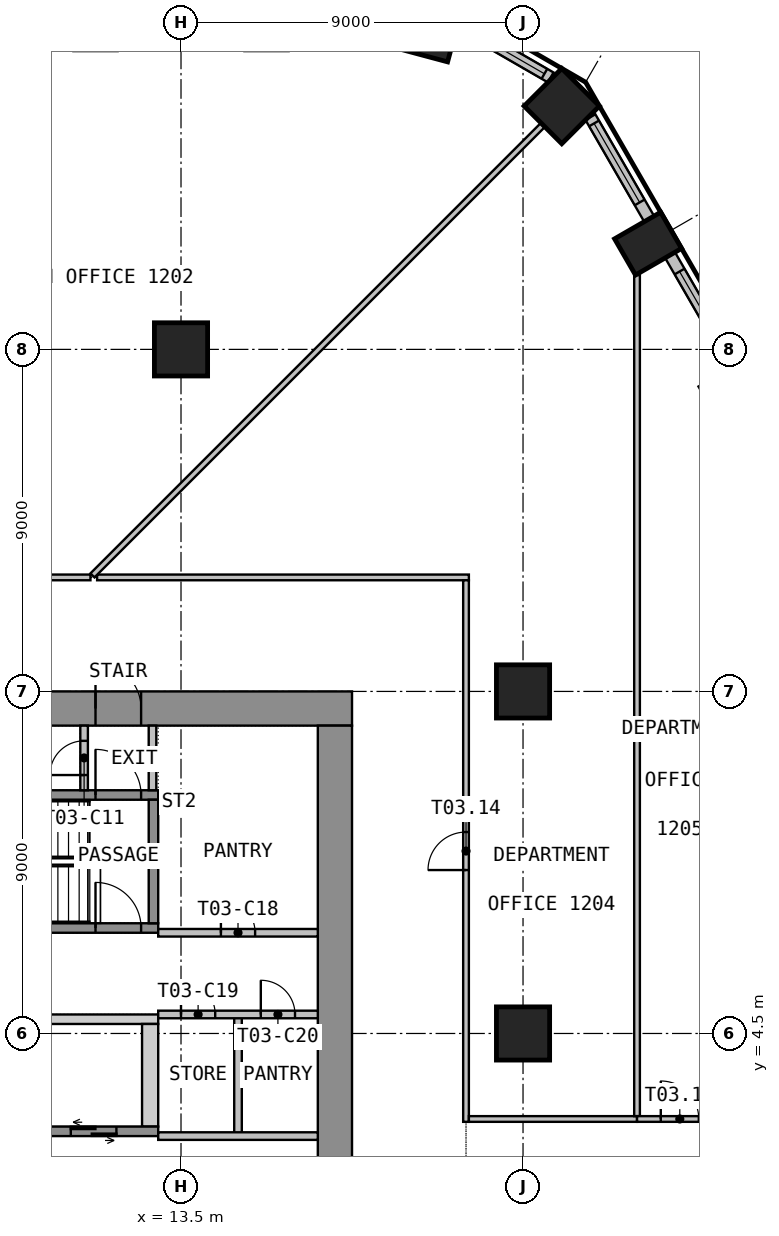
"""IFC4 building model, lengths in metres.
Left out: names, types, materials, properties, quantities, classifications, styles, units other than length and angle.
Written with IfcOpenShell. Run it as: python <this file> out.ifc"""

import sys

from ifc_helpers import new_model, si_unit, direction, frame, frame_2d, origin, origin_2d, place, context, subcontext, project, spatial, polyline, rectangle, circle, outline, extrude, element, fill, save


model = new_model("IFC4")
c1 = context("Model", 3, precision=1e-05, world=origin(), true_north=direction((0.0, 1.0)))
c2 = subcontext(c1, "Body", "Model", "MODEL_VIEW")
j1 = project(units=[si_unit("LENGTHUNIT", "METRE"), si_unit("PLANEANGLEUNIT", "RADIAN")], contexts=[c1])
p1 = place(None, origin())
s1 = spatial("IfcSite", under=j1, at=p1, CompositionType="ELEMENT")
p2 = place(p1, origin())
s2 = spatial("IfcBuilding", under=s1, at=p2, CompositionType="ELEMENT")
p3 = place(p2, frame((0.0, 0.0, 53.4)))
s3 = spatial("IfcBuildingStorey", under=s2, at=p3, CompositionType="ELEMENT", Elevation=53.4)
p4 = place(p3, frame((25.791, 25.283, 0.0), z_axis=(0.0, 0.0, 1.0), x_axis=(-0.5, 0.866025403784, 0.0)))
e1 = element("IfcColumn", 1, at=p4, inside=s3, PredefinedType="COLUMN", context=c2, shape_type="SweptSolid", body=[
    extrude(rectangle(XDim=1.1, YDim=1.4, at=origin_2d()), origin(), (0.0, 0.0, 1.0), 3.525),
])
for number, where, z_axis, x_axis in (
    (2, (23.52, 28.902, 0.0), (0.0, 0.0, 1.0), (-0.707, 0.707, 0.0)),
    (3, (20.02, 30.923, 0.0), (0.0, 0.0, 1.0), (-0.966, 0.259, 0.0)),
):
    element("IfcColumn", number, at=place(p3, frame(where, z_axis=z_axis, x_axis=x_axis)), inside=s3, PredefinedType="COLUMN", context=c2, shape_type="SweptSolid", body=[
        extrude(rectangle(XDim=1.4, YDim=1.4, at=origin_2d()), origin(), (0.0, 0.0, 1.0), 3.525),
    ])
for number, where, z_axis, x_axis in (
    (4, (13.5, 22.5, 0.0), (0.0, 0.0, 1.0), (1.0, 0.0, 0.0)),
    (5, (22.5, 4.5, 0.0), (0.0, 0.0, 1.0), (1.0, 0.0, 0.0)),
    (6, (22.5, 13.5, 0.0), (0.0, 0.0, 1.0), (1.0, 0.0, 0.0)),
):
    element("IfcColumn", number, at=place(p3, frame(where, z_axis=z_axis, x_axis=x_axis)), inside=s3, PredefinedType="COLUMN", context=c2, shape_type="SweptSolid", body=[
        extrude(circle(Radius=0.7, at=origin_2d()), origin(), (0.0, 0.0, 1.0), 3.525),
    ])
p5 = place(p3, frame((28.069, 22.037, 0.0), z_axis=(0.0, 0.0, 1.0), x_axis=(-0.499993955907, 0.866028893315, 0.0)))
e7 = element("IfcWall", 7, at=p5, inside=s3, PredefinedType="SOLIDWALL", context=c2, shape_type="SweptSolid", body=[
    extrude(rectangle(XDim=3.399, YDim=0.3, at=frame_2d((1.699, 0.0))), origin(), (0.0, 0.0, 1.0), 3.525),
])
p6 = place(p5, frame((0.5, 0.0, 0.9)))
e8 = element("IfcOpeningElement", 8, at=p6, cuts=e7, PredefinedType="OPENING", context=c2, shape_type="SweptSolid", body=[
    extrude(rectangle(XDim=2.4, YDim=2.1, at=frame_2d((1.2, 1.05))), frame((0.0, 0.16, 0.0), z_axis=(0.0, -1.0, 0.0), x_axis=(1.0, 0.0, 0.0)), (0.0, 0.0, 1.0), 0.32),
])
p7 = place(p3, frame((25.819, 25.934, 0.0), z_axis=(0.0, 0.0, 1.0), x_axis=(-0.499995950774, 0.866027741594, 0.0)))
e9 = element("IfcWall", 9, at=p7, inside=s3, PredefinedType="SOLIDWALL", context=c2, shape_type="SweptSolid", body=[
    extrude(rectangle(XDim=3.091, YDim=0.3, at=frame_2d((1.545, 0.0))), origin(), (0.0, 0.0, 1.0), 3.525),
])
p8 = place(p7, frame((0.5, 0.0, 0.9)))
e10 = element("IfcOpeningElement", 10, at=p8, cuts=e9, PredefinedType="OPENING", context=c2, shape_type="SweptSolid", body=[
    extrude(rectangle(XDim=2.4, YDim=2.1, at=frame_2d((1.2, 1.05))), frame((0.0, 0.16, 0.0), z_axis=(0.0, -1.0, 0.0), x_axis=(1.0, 0.0, 0.0)), (0.0, 0.0, 1.0), 0.32),
])
p9 = place(p3, frame((23.228, 29.656, 0.0), z_axis=(0.0, 0.0, 1.0), x_axis=(-0.866020456713, 0.500008568482, 0.0)))
e11 = element("IfcWall", 11, at=p9, inside=s3, PredefinedType="SOLIDWALL", context=c2, shape_type="SweptSolid", body=[
    extrude(rectangle(XDim=2.782, YDim=0.3, at=frame_2d((1.391, 0.0))), origin(), (0.0, 0.0, 1.0), 3.525),
])
p10 = place(p9, frame((0.191, 0.0, 0.9)))
e12 = element("IfcOpeningElement", 12, at=p10, cuts=e11, PredefinedType="OPENING", context=c2, shape_type="SweptSolid", body=[
    extrude(rectangle(XDim=2.4, YDim=2.1, at=frame_2d((1.2, 1.05))), frame((0.0, 0.16, 0.0), z_axis=(0.0, -1.0, 0.0), x_axis=(1.0, 0.0, 0.0)), (0.0, 0.0, 1.0), 0.32),
])
p11 = place(p3, frame((-18.0, 13.05, 0.0), z_axis=(0.0, 0.0, 1.0), x_axis=(1.0, 0.0, 0.0)))
e13 = element("IfcWall", 13, at=p11, inside=s3, PredefinedType="SHEAR", context=c2, shape_type="SweptSolid", body=[
    extrude(rectangle(XDim=36.0, YDim=0.9, at=frame_2d((18.0, 0.0))), origin(), (0.0, 0.0, 1.0), 3.525),
])
p12 = place(p11, frame((16.8, 0.0, 0.0)))
e14 = element("IfcOpeningElement", 14, at=p12, cuts=e13, PredefinedType="OPENING", context=c2, shape_type="SweptSolid", body=[
    extrude(rectangle(XDim=2.4, YDim=2.1, at=frame_2d((1.2, 1.05))), frame((0.0, 0.46, 0.0), z_axis=(0.0, -1.0, 0.0), x_axis=(1.0, 0.0, 0.0)), (0.0, 0.0, 1.0), 0.92),
])
p13 = place(p11, frame((5.55, 0.0, 0.0)))
e15 = element("IfcOpeningElement", 15, at=p13, cuts=e13, PredefinedType="OPENING", context=c2, shape_type="SweptSolid", body=[
    extrude(rectangle(XDim=1.2, YDim=2.1, at=frame_2d((0.6, 1.05))), frame((0.0, 0.46, 0.0), z_axis=(0.0, -1.0, 0.0), x_axis=(1.0, 0.0, 0.0)), (0.0, 0.0, 1.0), 0.92),
])
p14 = place(p11, frame((29.25, 0.0, 0.0)))
e16 = element("IfcOpeningElement", 16, at=p14, cuts=e13, PredefinedType="OPENING", context=c2, shape_type="SweptSolid", body=[
    extrude(rectangle(XDim=1.2, YDim=2.1, at=frame_2d((0.6, 1.05))), frame((0.0, 0.46, 0.0), z_axis=(0.0, -1.0, 0.0), x_axis=(1.0, 0.0, 0.0)), (0.0, 0.0, 1.0), 0.92),
])
p15 = place(p3, frame((17.55, -12.6, 0.0), z_axis=(0.0, 0.0, 1.0), x_axis=(0.0, 1.0, 0.0)))
e17 = element("IfcWall", 17, at=p15, inside=s3, PredefinedType="SHEAR", context=c2, shape_type="SweptSolid", body=[
    extrude(rectangle(XDim=25.2, YDim=0.9, at=frame_2d((12.6, 0.0))), origin(), (0.0, 0.0, 1.0), 3.525),
])
p16 = place(p15, frame((11.4, 0.0, 0.0)))
e18 = element("IfcOpeningElement", 18, at=p16, cuts=e17, PredefinedType="OPENING", context=c2, shape_type="SweptSolid", body=[
    extrude(rectangle(XDim=2.4, YDim=2.1, at=frame_2d((1.2, 1.05))), frame((0.0, 0.46, 0.0), z_axis=(0.0, -1.0, 0.0), x_axis=(1.0, 0.0, 0.0)), (0.0, 0.0, 1.0), 0.92),
])
p17 = place(p3, origin())
e19 = element("IfcWall", 19, at=p17, inside=s3, PredefinedType="SHEAR", context=c2, shape_type="SweptSolid", body=[
    extrude(outline(polyline([(-12.9, 4.75), (12.9, 4.75), (12.9, 5.0), (-12.9, 5.0), (-12.9, 4.75)])), origin(), (0.0, 0.0, 1.0), 3.525),
])
p18 = place(p3, origin())
e20 = element("IfcWall", 20, at=p18, inside=s3, PredefinedType="SHEAR", context=c2, shape_type="SweptSolid", body=[
    extrude(outline(polyline([(12.475, 2.05), (12.9, 2.05), (12.9, 4.75), (12.475, 4.75), (12.475, 2.05)])), origin(), (0.0, 0.0, 1.0), 3.525),
])
p19 = place(p3, frame((-12.9, 1.925, 0.0), z_axis=(0.0, 0.0, 1.0), x_axis=(1.0, 0.0, 0.0)))
e21 = element("IfcWall", 21, at=p19, inside=s3, PredefinedType="SHEAR", context=c2, shape_type="SweptSolid", body=[
    extrude(rectangle(XDim=25.8, YDim=0.25, at=frame_2d((12.9, 0.0))), origin(), (0.0, 0.0, 1.0), 3.525),
])
p20 = place(p19, frame((9.5, 0.0, 0.0)))
e22 = element("IfcOpeningElement", 22, at=p20, cuts=e21, PredefinedType="OPENING", context=c2, shape_type="SweptSolid", body=[
    extrude(rectangle(XDim=1.2, YDim=2.1, at=frame_2d((0.6, 1.05))), frame((0.0, 0.135, 0.0), z_axis=(0.0, -1.0, 0.0), x_axis=(1.0, 0.0, 0.0)), (0.0, 0.0, 1.0), 0.27),
])
p21 = place(p19, frame((12.3, 0.0, 0.0)))
e23 = element("IfcOpeningElement", 23, at=p21, cuts=e21, PredefinedType="OPENING", context=c2, shape_type="SweptSolid", body=[
    extrude(rectangle(XDim=1.2, YDim=2.1, at=frame_2d((0.6, 1.05))), frame((0.0, 0.135, 0.0), z_axis=(0.0, -1.0, 0.0), x_axis=(1.0, 0.0, 0.0)), (0.0, 0.0, 1.0), 0.27),
])
p22 = place(p19, frame((15.1, 0.0, 0.0)))
e24 = element("IfcOpeningElement", 24, at=p22, cuts=e21, PredefinedType="OPENING", context=c2, shape_type="SweptSolid", body=[
    extrude(rectangle(XDim=1.2, YDim=2.1, at=frame_2d((0.6, 1.05))), frame((0.0, 0.135, 0.0), z_axis=(0.0, -1.0, 0.0), x_axis=(1.0, 0.0, 0.0)), (0.0, 0.0, 1.0), 0.27),
])
p23 = place(p19, frame((17.9, 0.0, 0.0)))
e25 = element("IfcOpeningElement", 25, at=p23, cuts=e21, PredefinedType="OPENING", context=c2, shape_type="SweptSolid", body=[
    extrude(rectangle(XDim=1.2, YDim=2.1, at=frame_2d((0.6, 1.05))), frame((0.0, 0.135, 0.0), z_axis=(0.0, -1.0, 0.0), x_axis=(1.0, 0.0, 0.0)), (0.0, 0.0, 1.0), 0.27),
])
p24 = place(p19, frame((20.7, 0.0, 0.0)))
e26 = element("IfcOpeningElement", 26, at=p24, cuts=e21, PredefinedType="OPENING", context=c2, shape_type="SweptSolid", body=[
    extrude(rectangle(XDim=1.2, YDim=2.1, at=frame_2d((0.6, 1.05))), frame((0.0, 0.135, 0.0), z_axis=(0.0, -1.0, 0.0), x_axis=(1.0, 0.0, 0.0)), (0.0, 0.0, 1.0), 0.27),
])
p25 = place(p19, frame((23.5, 0.0, 0.0)))
e27 = element("IfcOpeningElement", 27, at=p25, cuts=e21, PredefinedType="OPENING", context=c2, shape_type="SweptSolid", body=[
    extrude(rectangle(XDim=1.2, YDim=2.1, at=frame_2d((0.6, 1.05))), frame((0.0, 0.135, 0.0), z_axis=(0.0, -1.0, 0.0), x_axis=(1.0, 0.0, 0.0)), (0.0, 0.0, 1.0), 0.27),
])
p26 = place(p3, frame((2.8, 7.275, 0.0), z_axis=(0.0, 0.0, 1.0), x_axis=(1.0, 0.0, 0.0)))
e28 = element("IfcWall", 28, at=p26, inside=s3, PredefinedType="SHEAR", context=c2, shape_type="SweptSolid", body=[
    extrude(rectangle(XDim=10.1, YDim=0.25, at=frame_2d((5.05, 0.0))), origin(), (0.0, 0.0, 1.0), 3.525),
])
p27 = place(p26, frame((8.45, 0.0, 0.0)))
e29 = element("IfcOpeningElement", 29, at=p27, cuts=e28, PredefinedType="OPENING", context=c2, shape_type="SweptSolid", body=[
    extrude(rectangle(XDim=1.2, YDim=2.1, at=frame_2d((0.6, 1.05))), frame((0.0, 0.135, 0.0), z_axis=(0.0, -1.0, 0.0), x_axis=(1.0, 0.0, 0.0)), (0.0, 0.0, 1.0), 0.27),
])
p28 = place(p3, frame((2.8, 10.775, 0.0), z_axis=(0.0, 0.0, 1.0), x_axis=(1.0, 0.0, 0.0)))
e30 = element("IfcWall", 30, at=p28, inside=s3, PredefinedType="SHEAR", context=c2, shape_type="SweptSolid", body=[
    extrude(rectangle(XDim=10.1, YDim=0.25, at=frame_2d((5.05, 0.0))), origin(), (0.0, 0.0, 1.0), 3.525),
])
p29 = place(p28, frame((8.45, 0.0, 0.0)))
e31 = element("IfcOpeningElement", 31, at=p29, cuts=e30, PredefinedType="OPENING", context=c2, shape_type="SweptSolid", body=[
    extrude(rectangle(XDim=1.2, YDim=2.1, at=frame_2d((0.6, 1.05))), frame((0.0, 0.135, 0.0), z_axis=(0.0, -1.0, 0.0), x_axis=(1.0, 0.0, 0.0)), (0.0, 0.0, 1.0), 0.27),
])
p30 = place(p3, frame((12.775, 7.4, 0.0), z_axis=(0.0, 0.0, 1.0), x_axis=(0.0, 1.0, 0.0)))
e32 = element("IfcWall", 32, at=p30, inside=s3, PredefinedType="SHEAR", context=c2, shape_type="SweptSolid", body=[
    extrude(rectangle(XDim=3.25, YDim=0.25, at=frame_2d((1.625, 0.0))), origin(), (0.0, 0.0, 1.0), 3.525),
])
p31 = place(p3, frame((12.75, 10.9, 0.0), z_axis=(0.0, 0.0, 1.0), x_axis=(0.0, 1.0, 0.0)))
e33 = element("IfcWall", 33, at=p31, inside=s3, PredefinedType="PARTITIONING", context=c2, shape_type="SweptSolid", body=[
    extrude(rectangle(XDim=1.7, YDim=0.2, at=frame_2d((0.85, 0.0))), origin(), (0.0, 0.0, 1.0), 3.525),
])
p32 = place(p3, frame((10.95, 10.9, 0.0), z_axis=(0.0, 0.0, 1.0), x_axis=(0.0, 1.0, 0.0)))
e34 = element("IfcWall", 34, at=p32, inside=s3, PredefinedType="PARTITIONING", context=c2, shape_type="SweptSolid", body=[
    extrude(rectangle(XDim=1.7, YDim=0.2, at=frame_2d((0.85, 0.0))), origin(), (0.0, 0.0, 1.0), 3.525),
])
p33 = place(p32, frame((0.4, 0.0, 0.0)))
e35 = element("IfcOpeningElement", 35, at=p33, cuts=e34, PredefinedType="OPENING", context=c2, shape_type="SweptSolid", body=[
    extrude(rectangle(XDim=0.9, YDim=2.1, at=frame_2d((0.45, 1.05))), frame((0.0, 0.11, 0.0), z_axis=(0.0, -1.0, 0.0), x_axis=(1.0, 0.0, 0.0)), (0.0, 0.0, 1.0), 0.22),
])
p34 = place(p3, frame((12.9, 7.15, 0.0), z_axis=(0.0, 0.0, 1.0), x_axis=(1.0, 0.0, 0.0)))
e36 = element("IfcWall", 36, at=p34, inside=s3, PredefinedType="PARTITIONING", context=c2, shape_type="SweptSolid", body=[
    extrude(rectangle(XDim=4.2, YDim=0.2, at=frame_2d((2.1, 0.0))), origin(), (0.0, 0.0, 1.0), 3.525),
])
p35 = place(p34, frame((1.65, 0.0, 0.0)))
e37 = element("IfcOpeningElement", 37, at=p35, cuts=e36, PredefinedType="OPENING", context=c2, shape_type="SweptSolid", body=[
    extrude(rectangle(XDim=0.9, YDim=2.1, at=frame_2d((0.45, 1.05))), frame((0.0, 0.11, 0.0), z_axis=(0.0, -1.0, 0.0), x_axis=(1.0, 0.0, 0.0)), (0.0, 0.0, 1.0), 0.22),
])
p36 = place(p3, frame((15.0, 1.8, 0.0), z_axis=(0.0, 0.0, 1.0), x_axis=(0.0, 1.0, 0.0)))
e38 = element("IfcWall", 38, at=p36, inside=s3, PredefinedType="PARTITIONING", context=c2, shape_type="SweptSolid", body=[
    extrude(rectangle(XDim=3.2, YDim=0.2, at=frame_2d((1.6, 0.0))), origin(), (0.0, 0.0, 1.0), 3.525),
])
p37 = place(p3, frame((12.9, 5.0, 0.0), z_axis=(0.0, 0.0, 1.0), x_axis=(1.0, 0.0, 0.0)))
e39 = element("IfcWall", 39, at=p37, inside=s3, PredefinedType="PARTITIONING", context=c2, shape_type="SweptSolid", body=[
    extrude(rectangle(XDim=4.2, YDim=0.2, at=frame_2d((2.1, 0.0))), origin(), (0.0, 0.0, 1.0), 3.525),
])
p38 = place(p37, frame((0.6, 0.0, 0.0)))
e40 = element("IfcOpeningElement", 40, at=p38, cuts=e39, PredefinedType="OPENING", context=c2, shape_type="SweptSolid", body=[
    extrude(rectangle(XDim=0.9, YDim=2.1, at=frame_2d((0.45, 1.05))), frame((0.0, 0.11, 0.0), z_axis=(0.0, -1.0, 0.0), x_axis=(1.0, 0.0, 0.0)), (0.0, 0.0, 1.0), 0.22),
])
p39 = place(p37, frame((2.7, 0.0, 0.0)))
e41 = element("IfcOpeningElement", 41, at=p39, cuts=e39, PredefinedType="OPENING", context=c2, shape_type="SweptSolid", body=[
    extrude(rectangle(XDim=0.9, YDim=2.1, at=frame_2d((0.45, 1.05))), frame((0.0, 0.11, 0.0), z_axis=(0.0, -1.0, 0.0), x_axis=(1.0, 0.0, 0.0)), (0.0, 0.0, 1.0), 0.22),
])
p40 = place(p3, frame((12.9, 1.8, 0.0), z_axis=(0.0, 0.0, 1.0), x_axis=(1.0, 0.0, 0.0)))
e42 = element("IfcWall", 42, at=p40, inside=s3, PredefinedType="PARTITIONING", context=c2, shape_type="SweptSolid", body=[
    extrude(rectangle(XDim=4.2, YDim=0.2, at=frame_2d((2.1, 0.0))), origin(), (0.0, 0.0, 1.0), 3.525),
])
p41 = place(p3, frame((11.117, 16.5, 0.0), z_axis=(0.0, 0.0, 1.0), x_axis=(-1.0, 0.0, 0.0)))
e43 = element("IfcWall", 43, at=p41, inside=s3, PredefinedType="PARTITIONING", context=c2, shape_type="SweptSolid", body=[
    extrude(rectangle(XDim=4.367, YDim=0.15, at=frame_2d((2.184, 0.0))), origin(), (0.0, 0.0, 1.0), 3.525),
])
p42 = place(p3, frame((21.075, 16.5, 0.0), z_axis=(0.0, 0.0, 1.0), x_axis=(-1.0, 0.0, 0.0)))
e44 = element("IfcWall", 44, at=p42, inside=s3, PredefinedType="PARTITIONING", context=c2, shape_type="SweptSolid", body=[
    extrude(rectangle(XDim=9.783, YDim=0.15, at=frame_2d((4.892, 0.0))), origin(), (0.0, 0.0, 1.0), 3.525),
])
p43 = place(p3, frame((23.01, 28.393, 0.0), z_axis=(0.0, 0.0, 1.0), x_axis=(-0.707106781187, -0.707106781187, 0.0)))
e45 = element("IfcWall", 45, at=p43, inside=s3, PredefinedType="PARTITIONING", context=c2, shape_type="SweptSolid", body=[
    extrude(rectangle(XDim=16.745, YDim=0.15, at=frame_2d((8.373, 0.0))), origin(), (0.0, 0.0, 1.0), 3.525),
])
p44 = place(p3, frame((21.0, 2.175, 0.0), z_axis=(0.0, 0.0, 1.0), x_axis=(0.0, 1.0, 0.0)))
e46 = element("IfcWall", 46, at=p44, inside=s3, PredefinedType="PARTITIONING", context=c2, shape_type="SweptSolid", body=[
    extrude(rectangle(XDim=14.25, YDim=0.15, at=frame_2d((7.125, 0.0))), origin(), (0.0, 0.0, 1.0), 3.525),
])
p45 = place(p44, frame((6.625, 0.0, 0.0)))
e47 = element("IfcOpeningElement", 47, at=p45, cuts=e46, PredefinedType="OPENING", context=c2, shape_type="SweptSolid", body=[
    extrude(rectangle(XDim=1.0, YDim=2.1, at=frame_2d((0.5, 1.05))), frame((0.0, 0.085, 0.0), z_axis=(0.0, -1.0, 0.0), x_axis=(1.0, 0.0, 0.0)), (0.0, 0.0, 1.0), 0.17),
])
p46 = place(p3, frame((21.075, 2.25, 0.0), z_axis=(0.0, 0.0, 1.0), x_axis=(1.0, 0.0, 0.0)))
e48 = element("IfcWall", 48, at=p46, inside=s3, PredefinedType="PARTITIONING", context=c2, shape_type="SweptSolid", body=[
    extrude(rectangle(XDim=4.425, YDim=0.15, at=frame_2d((2.212, 0.0))), origin(), (0.0, 0.0, 1.0), 3.525),
])
p47 = place(p3, frame((25.5, 24.457, 0.0), z_axis=(0.0, 0.0, 1.0), x_axis=(0.0, -1.0, 0.0)))
e49 = element("IfcWall", 49, at=p47, inside=s3, PredefinedType="PARTITIONING", context=c2, shape_type="SweptSolid", body=[
    extrude(rectangle(XDim=22.132, YDim=0.15, at=frame_2d((11.066, 0.0))), origin(), (0.0, 0.0, 1.0), 3.525),
])
p48 = place(p3, frame((25.5, 2.25, 0.0), z_axis=(0.0, 0.0, 1.0), x_axis=(1.0, 0.0, 0.0)))
e50 = element("IfcWall", 50, at=p48, inside=s3, PredefinedType="PARTITIONING", context=c2, shape_type="SweptSolid", body=[
    extrude(rectangle(XDim=2.25, YDim=0.15, at=frame_2d((1.125, 0.0))), origin(), (0.0, 0.0, 1.0), 3.525),
])
p49 = place(p48, frame((0.625, 0.0, 0.0)))
e51 = element("IfcOpeningElement", 51, at=p49, cuts=e50, PredefinedType="OPENING", context=c2, shape_type="SweptSolid", body=[
    extrude(rectangle(XDim=1.0, YDim=2.1, at=frame_2d((0.5, 1.05))), frame((0.0, 0.085, 0.0), z_axis=(0.0, -1.0, 0.0), x_axis=(1.0, 0.0, 0.0)), (0.0, 0.0, 1.0), 0.17),
])
p50 = place(p6, origin())
e52 = element("IfcWindow", 52, at=p50, inside=s3, PartitioningType="SINGLE_PANEL", PredefinedType="WINDOW", context=c2, shape_type="SweptSolid", body=[
    extrude(rectangle(XDim=2.4, YDim=2.1, at=frame_2d((1.2, 1.05))), frame((0.0, 0.03, 0.0), z_axis=(0.0, -1.0, 0.0), x_axis=(1.0, 0.0, 0.0)), (0.0, 0.0, 1.0), 0.06),
])
fill(e8, e52)
p51 = place(p8, origin())
e53 = element("IfcWindow", 53, at=p51, inside=s3, PartitioningType="SINGLE_PANEL", PredefinedType="WINDOW", context=c2, shape_type="SweptSolid", body=[
    extrude(rectangle(XDim=2.4, YDim=2.1, at=frame_2d((1.2, 1.05))), frame((0.0, 0.03, 0.0), z_axis=(0.0, -1.0, 0.0), x_axis=(1.0, 0.0, 0.0)), (0.0, 0.0, 1.0), 0.06),
])
fill(e10, e53)
p52 = place(p10, origin())
e54 = element("IfcWindow", 54, at=p52, inside=s3, PartitioningType="SINGLE_PANEL", PredefinedType="WINDOW", context=c2, shape_type="SweptSolid", body=[
    extrude(rectangle(XDim=2.4, YDim=2.1, at=frame_2d((1.2, 1.05))), frame((0.0, 0.03, 0.0), z_axis=(0.0, -1.0, 0.0), x_axis=(1.0, 0.0, 0.0)), (0.0, 0.0, 1.0), 0.06),
])
fill(e12, e54)
p53 = place(p14, origin())
e55 = element("IfcDoor", 55, at=p53, inside=s3, OperationType="SINGLE_SWING_RIGHT", PredefinedType="DOOR", context=c2, shape_type="SweptSolid", body=[
    extrude(rectangle(XDim=1.2, YDim=2.1, at=frame_2d((0.6, 1.05))), frame((0.0, 0.025, 0.0), z_axis=(0.0, -1.0, 0.0), x_axis=(1.0, 0.0, 0.0)), (0.0, 0.0, 1.0), 0.05),
])
fill(e16, e55)
p54 = place(p25, origin())
e56 = element("IfcDoor", 56, at=p54, inside=s3, OperationType="DOUBLE_DOOR_SLIDING", PredefinedType="DOOR", context=c2, shape_type="SweptSolid", body=[
    extrude(rectangle(XDim=1.2, YDim=2.1, at=frame_2d((0.6, 1.05))), frame((0.0, 0.025, 0.0), z_axis=(0.0, -1.0, 0.0), x_axis=(1.0, 0.0, 0.0)), (0.0, 0.0, 1.0), 0.05),
])
fill(e27, e56)
p55 = place(p27, origin())
e57 = element("IfcDoor", 57, at=p55, inside=s3, OperationType="SINGLE_SWING_LEFT", PredefinedType="DOOR", context=c2, shape_type="SweptSolid", body=[
    extrude(rectangle(XDim=1.2, YDim=2.1, at=frame_2d((0.6, 1.05))), frame((0.0, 0.025, 0.0), z_axis=(0.0, -1.0, 0.0), x_axis=(1.0, 0.0, 0.0)), (0.0, 0.0, 1.0), 0.05),
])
fill(e29, e57)
p56 = place(p29, origin())
e58 = element("IfcDoor", 58, at=p56, inside=s3, OperationType="SINGLE_SWING_RIGHT", PredefinedType="DOOR", context=c2, shape_type="SweptSolid", body=[
    extrude(rectangle(XDim=1.2, YDim=2.1, at=frame_2d((0.6, 1.05))), frame((0.0, 0.025, 0.0), z_axis=(0.0, -1.0, 0.0), x_axis=(1.0, 0.0, 0.0)), (0.0, 0.0, 1.0), 0.05),
])
fill(e31, e58)
p57 = place(p33, origin())
e59 = element("IfcDoor", 59, at=p57, inside=s3, OperationType="SINGLE_SWING_LEFT", PredefinedType="DOOR", context=c2, shape_type="SweptSolid", body=[
    extrude(rectangle(XDim=0.9, YDim=2.1, at=frame_2d((0.45, 1.05))), frame((0.0, 0.025, 0.0), z_axis=(0.0, -1.0, 0.0), x_axis=(1.0, 0.0, 0.0)), (0.0, 0.0, 1.0), 0.05),
])
fill(e35, e59)
p58 = place(p35, origin())
e60 = element("IfcDoor", 60, at=p58, inside=s3, OperationType="SINGLE_SWING_LEFT", PredefinedType="DOOR", context=c2, shape_type="SweptSolid", body=[
    extrude(rectangle(XDim=0.9, YDim=2.1, at=frame_2d((0.45, 1.05))), frame((0.0, 0.025, 0.0), z_axis=(0.0, -1.0, 0.0), x_axis=(1.0, 0.0, 0.0)), (0.0, 0.0, 1.0), 0.05),
])
fill(e37, e60)
p59 = place(p38, origin())
e61 = element("IfcDoor", 61, at=p59, inside=s3, OperationType="SINGLE_SWING_LEFT", PredefinedType="DOOR", context=c2, shape_type="SweptSolid", body=[
    extrude(rectangle(XDim=0.9, YDim=2.1, at=frame_2d((0.45, 1.05))), frame((0.0, 0.025, 0.0), z_axis=(0.0, -1.0, 0.0), x_axis=(1.0, 0.0, 0.0)), (0.0, 0.0, 1.0), 0.05),
])
fill(e40, e61)
p60 = place(p39, origin())
e62 = element("IfcDoor", 62, at=p60, inside=s3, OperationType="SINGLE_SWING_LEFT", PredefinedType="DOOR", context=c2, shape_type="SweptSolid", body=[
    extrude(rectangle(XDim=0.9, YDim=2.1, at=frame_2d((0.45, 1.05))), frame((0.0, 0.025, 0.0), z_axis=(0.0, -1.0, 0.0), x_axis=(1.0, 0.0, 0.0)), (0.0, 0.0, 1.0), 0.05),
])
fill(e41, e62)
p61 = place(p45, origin())
e63 = element("IfcDoor", 63, at=p61, inside=s3, OperationType="SINGLE_SWING_LEFT", PredefinedType="DOOR", context=c2, shape_type="SweptSolid", body=[
    extrude(rectangle(XDim=1.0, YDim=2.1, at=frame_2d((0.5, 1.05))), frame((0.0, 0.025, 0.0), z_axis=(0.0, -1.0, 0.0), x_axis=(1.0, 0.0, 0.0)), (0.0, 0.0, 1.0), 0.05),
])
fill(e47, e63)
p62 = place(p49, origin())
e64 = element("IfcDoor", 64, at=p62, inside=s3, OperationType="SINGLE_SWING_RIGHT", PredefinedType="DOOR", context=c2, shape_type="SweptSolid", body=[
    extrude(rectangle(XDim=1.0, YDim=2.1, at=frame_2d((0.5, 1.05))), frame((0.0, 0.025, 0.0), z_axis=(0.0, -1.0, 0.0), x_axis=(1.0, 0.0, 0.0)), (0.0, 0.0, 1.0), 0.05),
])
fill(e51, e64)
save(model, sys.argv[1])
